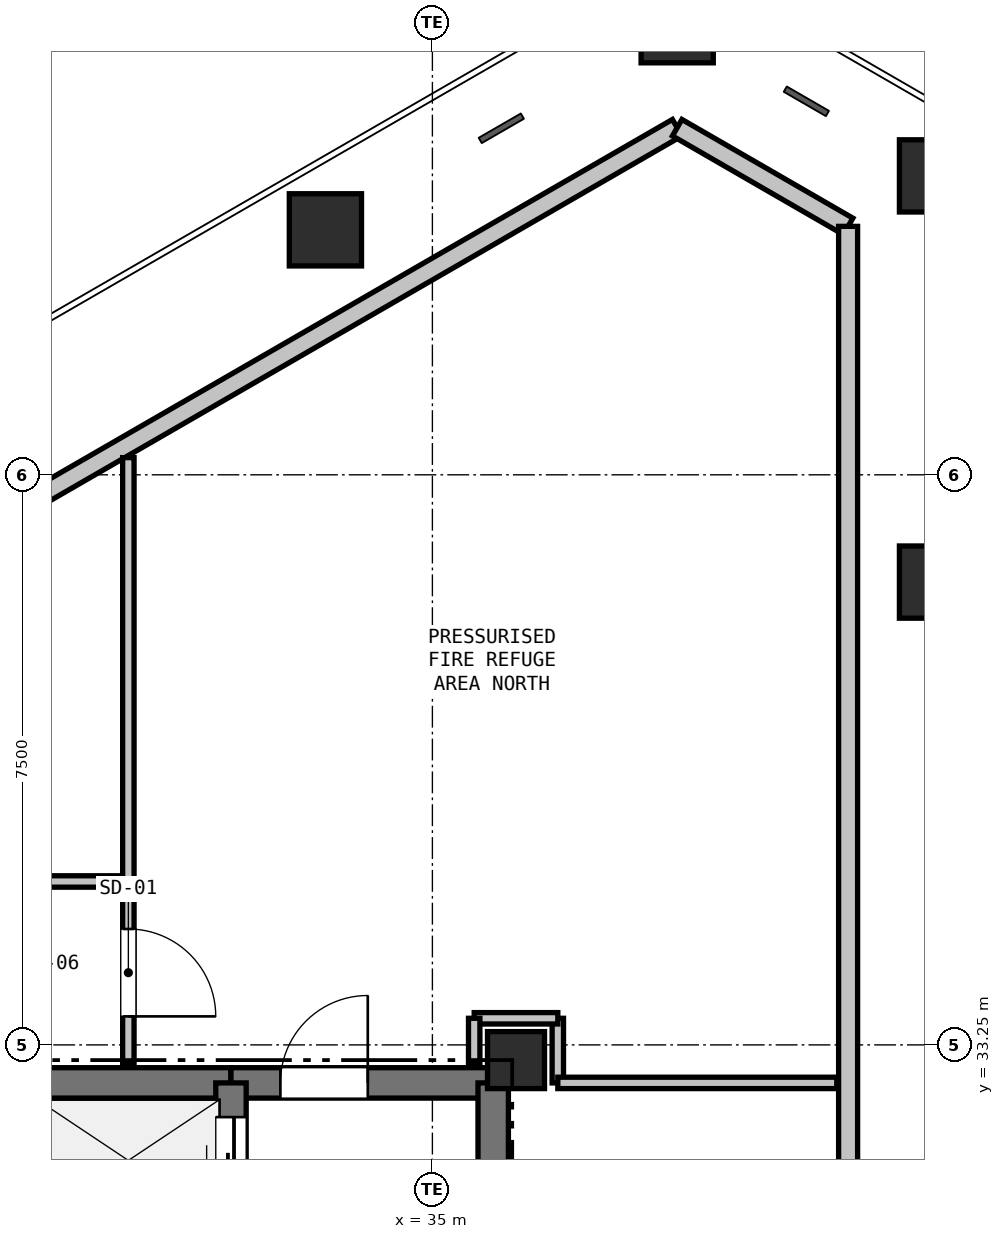
"""IFC4 building model, lengths in metres.
Left out: names, types, materials, properties, quantities, classifications, styles, units other than length and angle.
Written with IfcOpenShell. Run it as: python <this file> out.ifc"""

import sys

from ifc_helpers import new_model, si_unit, direction, frame, frame_2d, origin, origin_2d, place, context, subcontext, project, spatial, rectangle, hollow_rectangle, extrude, element, fill, save


model = new_model("IFC4")
c1 = context("Model", 3, precision=1e-05, world=origin(), true_north=direction((0.0, 1.0)))
c2 = subcontext(c1, "Body", "Model", "MODEL_VIEW")
j1 = project(units=[si_unit("LENGTHUNIT", "METRE"), si_unit("PLANEANGLEUNIT", "RADIAN")], contexts=[c1])
p1 = place(None, origin())
s1 = spatial("IfcSite", under=j1, at=p1, CompositionType="ELEMENT")
p2 = place(p1, origin())
s2 = spatial("IfcBuilding", under=s1, at=p2, CompositionType="ELEMENT")
p3 = place(p2, frame((0.0, 0.0, 160.8)))
s3 = spatial("IfcBuildingStorey", under=s2, at=p3, CompositionType="ELEMENT", Elevation=160.8)
p4 = place(p3, frame((36.1, 33.05, 0.0), z_axis=(0.0, 0.0, 1.0), x_axis=(1.0, 0.0, 0.0)))
e1 = element("IfcColumn", 1, at=p4, inside=s3, PredefinedType="COLUMN", context=c2, shape_type="SweptSolid", body=[
    extrude(rectangle(XDim=0.75, YDim=0.75, at=origin_2d()), origin(), (0.0, 0.0, 1.0), 6.6),
])
for number, where, z_axis, x_axis in (
    (2, (33.593, 43.973, 0.0), (0.0, 0.0, 1.0), (1.0, 0.0, 0.0)),
    (3, (38.22, 46.645, 0.0), (0.0, 0.0, 1.0), (1.0, 0.0, 0.0)),
    (4, (41.619, 44.683, 0.0), (0.0, 0.0, 1.0), (1.0, 0.0, 0.0)),
    (5, (41.619, 39.339, 0.0), (0.0, 0.0, 1.0), (1.0, 0.0, 0.0)),
):
    element("IfcColumn", number, at=place(p3, frame(where, z_axis=z_axis, x_axis=x_axis)), inside=s3, PredefinedType="COLUMN", context=c2, shape_type="SweptSolid", body=[
        extrude(hollow_rectangle(XDim=0.95, YDim=0.95, WallThickness=0.028, at=origin_2d()), origin(), (0.0, 0.0, 1.0), 5.02),
    ])
p5 = place(p3, frame((8.31, 28.048, 0.0), z_axis=(0.0, 0.0, 1.0), x_axis=(0.866026432802, 0.499998217685, 0.0)))
e6 = element("IfcWall", 6, at=p5, inside=s3, PredefinedType="SOLIDWALL", context=c2, shape_type="SweptSolid", body=[
    extrude(rectangle(XDim=34.537, YDim=0.25, at=frame_2d((17.269, 0.0))), origin(), (0.0, 0.0, 1.0), 4.755),
])
p6 = place(p3, frame((38.22, 45.317, 0.0), z_axis=(0.0, 0.0, 1.0), x_axis=(0.866024317969, -0.500001880682, 0.0)))
e7 = element("IfcWall", 7, at=p6, inside=s3, PredefinedType="SOLIDWALL", context=c2, shape_type="SweptSolid", body=[
    extrude(rectangle(XDim=2.597, YDim=0.25, at=frame_2d((1.298, 0.0))), origin(), (0.0, 0.0, 1.0), 5.005),
])
p7 = place(p3, frame((40.469, 44.019, 0.0), z_axis=(0.0, 0.0, 1.0), x_axis=(0.0, -1.0, 0.0)))
e8 = element("IfcWall", 8, at=p7, inside=s3, PredefinedType="SOLIDWALL", context=c2, shape_type="SweptSolid", body=[
    extrude(rectangle(XDim=34.537, YDim=0.25, at=frame_2d((17.269, 0.0))), origin(), (0.0, 0.0, 1.0), 5.005),
])
p8 = place(p3, frame((29.65, 32.75, 0.0), z_axis=(0.0, 0.0, 1.0), x_axis=(1.0, 0.0, 0.0)))
e9 = element("IfcWall", 9, at=p8, inside=s3, PredefinedType="SHEAR", context=c2, shape_type="SweptSolid", body=[
    extrude(rectangle(XDim=2.7, YDim=0.4, at=frame_2d((1.35, 0.0))), origin(), (0.0, 0.0, 1.0), 6.37),
])
p9 = place(p3, frame((32.35, 32.75, 0.0), z_axis=(0.0, 0.0, 1.0), x_axis=(1.0, 0.0, 0.0)))
e10 = element("IfcWall", 10, at=p9, inside=s3, PredefinedType="SHEAR", context=c2, shape_type="SweptSolid", body=[
    extrude(rectangle(XDim=3.45, YDim=0.4, at=frame_2d((1.725, 0.0))), origin(), (0.0, 0.0, 1.0), 6.37),
])
p10 = place(p9, frame((0.65, 0.0, 0.0)))
e11 = element("IfcOpeningElement", 11, at=p10, cuts=e10, PredefinedType="OPENING", context=c2, shape_type="SweptSolid", body=[
    extrude(rectangle(XDim=1.15, YDim=2.15, at=frame_2d((0.575, 1.075))), frame((0.0, 0.21, 0.0), z_axis=(0.0, -1.0, 0.0), x_axis=(1.0, 0.0, 0.0)), (0.0, 0.0, 1.0), 0.42),
])
p11 = place(p3, frame((35.8, 32.75, 0.0), z_axis=(0.0, 0.0, 1.0), x_axis=(0.0, -1.0, 0.0)))
e12 = element("IfcWall", 12, at=p11, inside=s3, PredefinedType="SHEAR", context=c2, shape_type="SweptSolid", body=[
    extrude(rectangle(XDim=4.65, YDim=0.4, at=frame_2d((2.325, 0.0))), origin(), (0.0, 0.0, 1.0), 6.37),
])
p12 = place(p3, frame((32.35, 30.75, 0.0), z_axis=(0.0, 0.0, 1.0), x_axis=(0.0, 1.0, 0.0)))
e13 = element("IfcWall", 13, at=p12, inside=s3, PredefinedType="SHEAR", context=c2, shape_type="SweptSolid", body=[
    extrude(rectangle(XDim=2.0, YDim=0.4, at=frame_2d((1.0, 0.0))), origin(), (0.0, 0.0, 1.0), 6.37),
])
p13 = place(p12, frame((0.45, 0.0, 0.0)))
e14 = element("IfcOpeningElement", 14, at=p13, cuts=e13, PredefinedType="OPENING", context=c2, shape_type="SweptSolid", body=[
    extrude(rectangle(XDim=1.1, YDim=2.15, at=frame_2d((0.55, 1.075))), frame((0.0, 0.21, 0.0), z_axis=(0.0, -1.0, 0.0), x_axis=(1.0, 0.0, 0.0)), (0.0, 0.0, 1.0), 0.42),
])
p14 = place(p3, frame((21.315, 35.4, 0.0), z_axis=(0.0, 0.0, 1.0), x_axis=(1.0, 0.0, 0.0)))
e15 = element("IfcWall", 15, at=p14, inside=s3, PredefinedType="PARTITIONING", context=c2, shape_type="SweptSolid", body=[
    extrude(rectangle(XDim=9.685, YDim=0.15, at=frame_2d((4.843, 0.0))), origin(), (0.0, 0.0, 1.0), 5.005),
])
p15 = place(p14, frame((4.417, 0.0, 0.0)))
e16 = element("IfcOpeningElement", 16, at=p15, cuts=e15, PredefinedType="OPENING", context=c2, shape_type="SweptSolid", body=[
    extrude(rectangle(XDim=0.85, YDim=2.1, at=frame_2d((0.425, 1.05))), frame((0.0, 0.085, 0.0), z_axis=(0.0, -1.0, 0.0), x_axis=(1.0, 0.0, 0.0)), (0.0, 0.0, 1.0), 0.17),
])
p16 = place(p3, frame((31.0, 35.4, 0.0), z_axis=(0.0, 0.0, 1.0), x_axis=(0.0, -1.0, 0.0)))
e17 = element("IfcWall", 17, at=p16, inside=s3, PredefinedType="PARTITIONING", context=c2, shape_type="SweptSolid", body=[
    extrude(rectangle(XDim=2.4, YDim=0.15, at=frame_2d((1.2, 0.0))), origin(), (0.0, 0.0, 1.0), 5.005),
])
p17 = place(p16, frame((0.625, 0.0, 0.0)))
e18 = element("IfcOpeningElement", 18, at=p17, cuts=e17, PredefinedType="OPENING", context=c2, shape_type="SweptSolid", body=[
    extrude(rectangle(XDim=1.15, YDim=2.15, at=frame_2d((0.575, 1.075))), frame((0.0, 0.085, 0.0), z_axis=(0.0, -1.0, 0.0), x_axis=(1.0, 0.0, 0.0)), (0.0, 0.0, 1.0), 0.17),
])
p18 = place(p3, frame((36.65, 32.75, 0.0), z_axis=(0.0, 0.0, 1.0), x_axis=(0.0, 1.0, 0.0)))
e19 = element("IfcWall", 19, at=p18, inside=s3, PredefinedType="PARTITIONING", context=c2, shape_type="SweptSolid", body=[
    extrude(rectangle(XDim=0.85, YDim=0.15, at=frame_2d((0.425, 0.0))), origin(), (0.0, 0.0, 1.0), 5.005),
])
p19 = place(p3, frame((36.65, 33.6, 0.0), z_axis=(0.0, 0.0, 1.0), x_axis=(-1.0, 0.0, 0.0)))
e20 = element("IfcWall", 20, at=p19, inside=s3, PredefinedType="PARTITIONING", context=c2, shape_type="SweptSolid", body=[
    extrude(rectangle(XDim=1.1, YDim=0.15, at=frame_2d((0.55, 0.0))), origin(), (0.0, 0.0, 1.0), 5.005),
])
p20 = place(p3, frame((35.55, 33.6, 0.0), z_axis=(0.0, 0.0, 1.0), x_axis=(0.0, -1.0, 0.0)))
e21 = element("IfcWall", 21, at=p20, inside=s3, PredefinedType="PARTITIONING", context=c2, shape_type="SweptSolid", body=[
    extrude(rectangle(XDim=0.6, YDim=0.15, at=frame_2d((0.3, 0.0))), origin(), (0.0, 0.0, 1.0), 5.005),
])
p21 = place(p3, frame((31.0, 35.4, 0.0), z_axis=(0.0, 0.0, 1.0), x_axis=(0.0, 1.0, 0.0)))
e22 = element("IfcWall", 22, at=p21, inside=s3, PredefinedType="PARTITIONING", context=c2, shape_type="SweptSolid", body=[
    extrude(rectangle(XDim=5.576, YDim=0.15, at=frame_2d((2.788, 0.0))), origin(), (0.0, 0.0, 1.0), 5.005),
])
p22 = place(p3, frame((40.32, 32.75, 0.0), z_axis=(0.0, 0.0, 1.0), x_axis=(-1.0, 0.0, 0.0)))
e23 = element("IfcWall", 23, at=p22, inside=s3, PredefinedType="PARTITIONING", context=c2, shape_type="SweptSolid", body=[
    extrude(rectangle(XDim=3.67, YDim=0.15, at=frame_2d((1.835, 0.0))), origin(), (0.0, 0.0, 1.0), 6.37),
])
p23 = place(p13, origin())
e24 = element("IfcDoor", 24, at=p23, inside=s3, OperationType="SLIDING_TO_LEFT", PredefinedType="DOOR", context=c2, shape_type="SweptSolid", body=[
    extrude(rectangle(XDim=1.1, YDim=2.15, at=frame_2d((0.55, 1.075))), frame((0.0, 0.025, 0.0), z_axis=(0.0, -1.0, 0.0), x_axis=(1.0, 0.0, 0.0)), (0.0, 0.0, 1.0), 0.05),
])
fill(e14, e24)
p24 = place(p10, origin())
e25 = element("IfcDoor", 25, at=p24, inside=s3, OperationType="SINGLE_SWING_RIGHT", PredefinedType="DOOR", context=c2, shape_type="SweptSolid", body=[
    extrude(rectangle(XDim=1.15, YDim=2.15, at=frame_2d((0.575, 1.075))), frame((0.0, 0.025, 0.0), z_axis=(0.0, -1.0, 0.0), x_axis=(1.0, 0.0, 0.0)), (0.0, 0.0, 1.0), 0.05),
])
fill(e11, e25)
p25 = place(p17, origin())
e26 = element("IfcDoor", 26, at=p25, inside=s3, OperationType="SINGLE_SWING_RIGHT", PredefinedType="DOOR", context=c2, shape_type="SweptSolid", body=[
    extrude(rectangle(XDim=1.15, YDim=2.15, at=frame_2d((0.575, 1.075))), frame((0.0, 0.025, 0.0), z_axis=(0.0, -1.0, 0.0), x_axis=(1.0, 0.0, 0.0)), (0.0, 0.0, 1.0), 0.05),
])
fill(e18, e26)
save(model, sys.argv[1])
